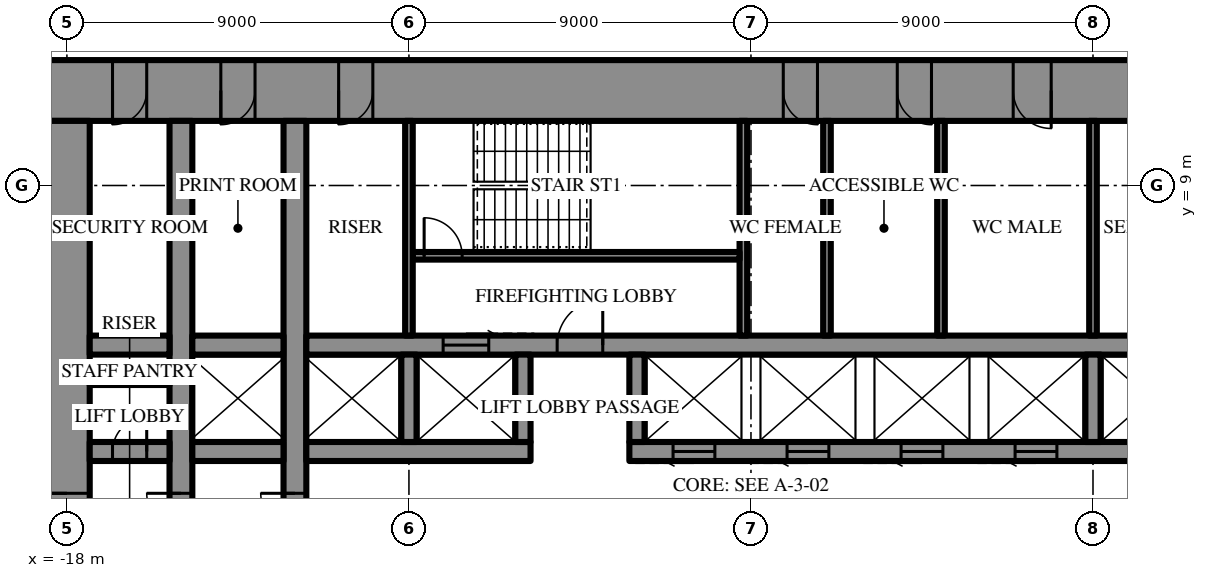
"""IFC4 building model, lengths in metres.
Left out: names, types, materials, properties, quantities, classifications, styles, units other than length and angle.
Written with IfcOpenShell. Run it as: python <this file> out.ifc"""

import sys

from ifc_helpers import new_model, si_unit, direction, frame, frame_2d, origin, place, context, subcontext, project, spatial, rectangle, extrude, element, fill, save


model = new_model("IFC4")
c1 = context("Model", 3, precision=1e-05, world=origin(), true_north=direction((0.0, 1.0)))
c2 = subcontext(c1, "Body", "Model", "MODEL_VIEW")
j1 = project(units=[si_unit("LENGTHUNIT", "METRE"), si_unit("PLANEANGLEUNIT", "RADIAN")], contexts=[c1])
p1 = place(None, origin())
s1 = spatial("IfcSite", under=j1, at=p1, CompositionType="ELEMENT")
p2 = place(p1, origin())
s2 = spatial("IfcBuilding", under=s1, at=p2, CompositionType="ELEMENT")
p3 = place(p2, frame((0.0, 0.0, 136.3)))
s3 = spatial("IfcBuildingStorey", under=s2, at=p3, CompositionType="ELEMENT", Elevation=136.3)
p4 = place(p3, frame((-18.6, 11.5, 0.0), z_axis=(0.0, 0.0, 1.0), x_axis=(1.0, 0.0, 0.0)))
e1 = element("IfcWall", 1, at=p4, inside=s3, PredefinedType="SHEAR", context=c2, shape_type="SweptSolid", body=[
    extrude(rectangle(XDim=37.2, YDim=1.6, at=frame_2d((18.6, 0.0))), origin(), (0.0, 0.0, 1.0), 4.2),
])
p5 = place(p4, frame((19.45, 0.0, 0.0)))
e2 = element("IfcOpeningElement", 2, at=p5, cuts=e1, PredefinedType="OPENING", context=c2, shape_type="SweptSolid", body=[
    extrude(rectangle(XDim=0.9, YDim=2.2, at=frame_2d((0.45, 1.1))), frame((0.0, 0.81, 0.0), z_axis=(0.0, -1.0, 0.0), x_axis=(1.0, 0.0, 0.0)), (0.0, 0.0, 1.0), 1.62),
])
p6 = place(p4, frame((22.45, 0.0, 0.0)))
e3 = element("IfcOpeningElement", 3, at=p6, cuts=e1, PredefinedType="OPENING", context=c2, shape_type="SweptSolid", body=[
    extrude(rectangle(XDim=0.9, YDim=2.2, at=frame_2d((0.45, 1.1))), frame((0.0, 0.81, 0.0), z_axis=(0.0, -1.0, 0.0), x_axis=(1.0, 0.0, 0.0)), (0.0, 0.0, 1.0), 1.62),
])
p7 = place(p4, frame((25.5, 0.0, 0.0)))
e4 = element("IfcOpeningElement", 4, at=p7, cuts=e1, PredefinedType="OPENING", context=c2, shape_type="SweptSolid", body=[
    extrude(rectangle(XDim=1.0, YDim=2.2, at=frame_2d((0.5, 1.1))), frame((0.0, 0.81, 0.0), z_axis=(0.0, -1.0, 0.0), x_axis=(1.0, 0.0, 0.0)), (0.0, 0.0, 1.0), 1.62),
])
p8 = place(p4, frame((1.8, 0.0, 0.0)))
e5 = element("IfcOpeningElement", 5, at=p8, cuts=e1, PredefinedType="OPENING", context=c2, shape_type="SweptSolid", body=[
    extrude(rectangle(XDim=0.9, YDim=2.2, at=frame_2d((0.45, 1.1))), frame((0.0, 0.81, 0.0), z_axis=(0.0, -1.0, 0.0), x_axis=(1.0, 0.0, 0.0)), (0.0, 0.0, 1.0), 1.62),
])
p9 = place(p4, frame((4.65, 0.0, 0.0)))
e6 = element("IfcOpeningElement", 6, at=p9, cuts=e1, PredefinedType="OPENING", context=c2, shape_type="SweptSolid", body=[
    extrude(rectangle(XDim=0.9, YDim=2.2, at=frame_2d((0.45, 1.1))), frame((0.0, 0.81, 0.0), z_axis=(0.0, -1.0, 0.0), x_axis=(1.0, 0.0, 0.0)), (0.0, 0.0, 1.0), 1.62),
])
p10 = place(p4, frame((7.75, 0.0, 0.0)))
e7 = element("IfcOpeningElement", 7, at=p10, cuts=e1, PredefinedType="OPENING", context=c2, shape_type="SweptSolid", body=[
    extrude(rectangle(XDim=0.9, YDim=2.2, at=frame_2d((0.45, 1.1))), frame((0.0, 0.81, 0.0), z_axis=(0.0, -1.0, 0.0), x_axis=(1.0, 0.0, 0.0)), (0.0, 0.0, 1.0), 1.62),
])
p11 = place(p4, frame((28.55, 0.0, 0.0)))
e8 = element("IfcOpeningElement", 8, at=p11, cuts=e1, PredefinedType="OPENING", context=c2, shape_type="SweptSolid", body=[
    extrude(rectangle(XDim=0.9, YDim=2.2, at=frame_2d((0.45, 1.1))), frame((0.0, 0.81, 0.0), z_axis=(0.0, -1.0, 0.0), x_axis=(1.0, 0.0, 0.0)), (0.0, 0.0, 1.0), 1.62),
])
p12 = place(p4, frame((31.65, 0.0, 0.0)))
e9 = element("IfcOpeningElement", 9, at=p12, cuts=e1, PredefinedType="OPENING", context=c2, shape_type="SweptSolid", body=[
    extrude(rectangle(XDim=0.9, YDim=2.2, at=frame_2d((0.45, 1.1))), frame((0.0, 0.81, 0.0), z_axis=(0.0, -1.0, 0.0), x_axis=(1.0, 0.0, 0.0)), (0.0, 0.0, 1.0), 1.62),
])
p13 = place(p4, frame((34.5, 0.0, 0.0)))
e10 = element("IfcOpeningElement", 10, at=p13, cuts=e1, PredefinedType="OPENING", context=c2, shape_type="SweptSolid", body=[
    extrude(rectangle(XDim=0.9, YDim=2.2, at=frame_2d((0.45, 1.1))), frame((0.0, 0.81, 0.0), z_axis=(0.0, -1.0, 0.0), x_axis=(1.0, 0.0, 0.0)), (0.0, 0.0, 1.0), 1.62),
])
p14 = place(p3, frame((-18.0, 10.7, 0.0), z_axis=(0.0, 0.0, 1.0), x_axis=(0.0, -1.0, 0.0)))
e11 = element("IfcWall", 11, at=p14, inside=s3, PredefinedType="SHEAR", context=c2, shape_type="SweptSolid", body=[
    extrude(rectangle(XDim=21.4, YDim=1.2, at=frame_2d((10.7, 0.0))), origin(), (0.0, 0.0, 1.0), 4.2),
])
p15 = place(p14, frame((9.8, 0.0, 0.0)))
e12 = element("IfcOpeningElement", 12, at=p15, cuts=e11, PredefinedType="OPENING", context=c2, shape_type="SweptSolid", body=[
    extrude(rectangle(XDim=1.8, YDim=2.4, at=frame_2d((0.9, 1.2))), frame((0.0, 0.61, 0.0), z_axis=(0.0, -1.0, 0.0), x_axis=(1.0, 0.0, 0.0)), (0.0, 0.0, 1.0), 1.22),
])
p16 = place(p3, frame((-12.0, -10.7, 0.0), z_axis=(0.0, 0.0, 1.0), x_axis=(0.0, 1.0, 0.0)))
e13 = element("IfcWall", 13, at=p16, inside=s3, PredefinedType="SHEAR", context=c2, shape_type="SweptSolid", body=[
    extrude(rectangle(XDim=21.4, YDim=0.6, at=frame_2d((10.7, 0.0))), origin(), (0.0, 0.0, 1.0), 4.2),
])
p17 = place(p16, frame((9.8, 0.0, 0.0)))
e14 = element("IfcOpeningElement", 14, at=p17, cuts=e13, PredefinedType="OPENING", context=c2, shape_type="SweptSolid", body=[
    extrude(rectangle(XDim=1.8, YDim=2.4, at=frame_2d((0.9, 1.2))), frame((0.0, 0.31, 0.0), z_axis=(0.0, -1.0, 0.0), x_axis=(1.0, 0.0, 0.0)), (0.0, 0.0, 1.0), 0.62),
])
p18 = place(p3, frame((-15.0, -10.7, 0.0), z_axis=(0.0, 0.0, 1.0), x_axis=(0.0, 1.0, 0.0)))
e15 = element("IfcWall", 15, at=p18, inside=s3, PredefinedType="SHEAR", context=c2, shape_type="SweptSolid", body=[
    extrude(rectangle(XDim=21.4, YDim=0.6, at=frame_2d((10.7, 0.0))), origin(), (0.0, 0.0, 1.0), 4.2),
])
p19 = place(p18, frame((9.8, 0.0, 0.0)))
e16 = element("IfcOpeningElement", 16, at=p19, cuts=e15, PredefinedType="OPENING", context=c2, shape_type="SweptSolid", body=[
    extrude(rectangle(XDim=1.8, YDim=2.4, at=frame_2d((0.9, 1.2))), frame((0.0, 0.31, 0.0), z_axis=(0.0, -1.0, 0.0), x_axis=(1.0, 0.0, 0.0)), (0.0, 0.0, 1.0), 0.62),
])
p20 = place(p3, frame((-17.4, 2.0, 0.0), z_axis=(0.0, 0.0, 1.0), x_axis=(1.0, 0.0, 0.0)))
e17 = element("IfcWall", 17, at=p20, inside=s3, PredefinedType="SHEAR", context=c2, shape_type="SweptSolid", body=[
    extrude(rectangle(XDim=2.1, YDim=0.5, at=frame_2d((1.05, 0.0))), origin(), (0.0, 0.0, 1.0), 4.2),
])
p21 = place(p20, frame((0.6, 0.0, 0.0)))
e18 = element("IfcOpeningElement", 18, at=p21, cuts=e17, PredefinedType="OPENING", context=c2, shape_type="SweptSolid", body=[
    extrude(rectangle(XDim=0.9, YDim=2.2, at=frame_2d((0.45, 1.1))), frame((0.0, 0.26, 0.0), z_axis=(0.0, -1.0, 0.0), x_axis=(1.0, 0.0, 0.0)), (0.0, 0.0, 1.0), 0.52),
])
p22 = place(p3, frame((-14.7, 2.0, 0.0), z_axis=(0.0, 0.0, 1.0), x_axis=(1.0, 0.0, 0.0)))
e19 = element("IfcWall", 19, at=p22, inside=s3, PredefinedType="SHEAR", context=c2, shape_type="SweptSolid", body=[
    extrude(rectangle(XDim=2.4, YDim=0.5, at=frame_2d((1.2, 0.0))), origin(), (0.0, 0.0, 1.0), 4.2),
])
p23 = place(p3, frame((-11.7, 2.0, 0.0), z_axis=(0.0, 0.0, 1.0), x_axis=(1.0, 0.0, 0.0)))
e20 = element("IfcWall", 20, at=p23, inside=s3, PredefinedType="SHEAR", context=c2, shape_type="SweptSolid", body=[
    extrude(rectangle(XDim=5.9, YDim=0.5, at=frame_2d((2.95, 0.0))), origin(), (0.0, 0.0, 1.0), 4.2),
])
p24 = place(p3, frame((-3.2, 2.0, 0.0), z_axis=(0.0, 0.0, 1.0), x_axis=(1.0, 0.0, 0.0)))
e21 = element("IfcWall", 21, at=p24, inside=s3, PredefinedType="SHEAR", context=c2, shape_type="SweptSolid", body=[
    extrude(rectangle(XDim=14.9, YDim=0.5, at=frame_2d((7.45, 0.0))), origin(), (0.0, 0.0, 1.0), 4.2),
])
p25 = place(p24, frame((1.15, 0.0, 0.0)))
e22 = element("IfcOpeningElement", 22, at=p25, cuts=e21, PredefinedType="OPENING", context=c2, shape_type="SweptSolid", body=[
    extrude(rectangle(XDim=1.1, YDim=2.2, at=frame_2d((0.55, 1.1))), frame((0.0, 0.26, 0.0), z_axis=(0.0, -1.0, 0.0), x_axis=(1.0, 0.0, 0.0)), (0.0, 0.0, 1.0), 0.52),
])
p26 = place(p24, frame((4.15, 0.0, 0.0)))
e23 = element("IfcOpeningElement", 23, at=p26, cuts=e21, PredefinedType="OPENING", context=c2, shape_type="SweptSolid", body=[
    extrude(rectangle(XDim=1.1, YDim=2.2, at=frame_2d((0.55, 1.1))), frame((0.0, 0.26, 0.0), z_axis=(0.0, -1.0, 0.0), x_axis=(1.0, 0.0, 0.0)), (0.0, 0.0, 1.0), 0.52),
])
p27 = place(p24, frame((7.15, 0.0, 0.0)))
e24 = element("IfcOpeningElement", 24, at=p27, cuts=e21, PredefinedType="OPENING", context=c2, shape_type="SweptSolid", body=[
    extrude(rectangle(XDim=1.1, YDim=2.2, at=frame_2d((0.55, 1.1))), frame((0.0, 0.26, 0.0), z_axis=(0.0, -1.0, 0.0), x_axis=(1.0, 0.0, 0.0)), (0.0, 0.0, 1.0), 0.52),
])
p28 = place(p24, frame((10.15, 0.0, 0.0)))
e25 = element("IfcOpeningElement", 25, at=p28, cuts=e21, PredefinedType="OPENING", context=c2, shape_type="SweptSolid", body=[
    extrude(rectangle(XDim=1.1, YDim=2.2, at=frame_2d((0.55, 1.1))), frame((0.0, 0.26, 0.0), z_axis=(0.0, -1.0, 0.0), x_axis=(1.0, 0.0, 0.0)), (0.0, 0.0, 1.0), 0.52),
])
p29 = place(p3, frame((-17.4, 4.8, 0.0), z_axis=(0.0, 0.0, 1.0), x_axis=(1.0, 0.0, 0.0)))
e26 = element("IfcWall", 26, at=p29, inside=s3, PredefinedType="SHEAR", context=c2, shape_type="SweptSolid", body=[
    extrude(rectangle(XDim=2.1, YDim=0.5, at=frame_2d((1.05, 0.0))), origin(), (0.0, 0.0, 1.0), 4.2),
])
p30 = place(p3, frame((-14.7, 4.8, 0.0), z_axis=(0.0, 0.0, 1.0), x_axis=(1.0, 0.0, 0.0)))
e27 = element("IfcWall", 27, at=p30, inside=s3, PredefinedType="SHEAR", context=c2, shape_type="SweptSolid", body=[
    extrude(rectangle(XDim=2.4, YDim=0.5, at=frame_2d((1.2, 0.0))), origin(), (0.0, 0.0, 1.0), 4.2),
])
p31 = place(p3, frame((-11.7, 4.8, 0.0), z_axis=(0.0, 0.0, 1.0), x_axis=(1.0, 0.0, 0.0)))
e28 = element("IfcWall", 28, at=p31, inside=s3, PredefinedType="SHEAR", context=c2, shape_type="SweptSolid", body=[
    extrude(rectangle(XDim=23.4, YDim=0.5, at=frame_2d((11.7, 0.0))), origin(), (0.0, 0.0, 1.0), 4.2),
])
p32 = place(p31, frame((6.6, 0.0, 0.0)))
e29 = element("IfcOpeningElement", 29, at=p32, cuts=e28, PredefinedType="OPENING", context=c2, shape_type="SweptSolid", body=[
    extrude(rectangle(XDim=1.2, YDim=2.2, at=frame_2d((0.6, 1.1))), frame((0.0, 0.26, 0.0), z_axis=(0.0, -1.0, 0.0), x_axis=(1.0, 0.0, 0.0)), (0.0, 0.0, 1.0), 0.52),
])
p33 = place(p31, frame((3.6, 0.0, 0.0)))
e30 = element("IfcOpeningElement", 30, at=p33, cuts=e28, PredefinedType="OPENING", context=c2, shape_type="SweptSolid", body=[
    extrude(rectangle(XDim=1.2, YDim=2.2, at=frame_2d((0.6, 1.1))), frame((0.0, 0.26, 0.0), z_axis=(0.0, -1.0, 0.0), x_axis=(1.0, 0.0, 0.0)), (0.0, 0.0, 1.0), 0.52),
])
for number, where, z_axis, x_axis in (
    (31, (-9.0, 2.25, 0.0), (0.0, 0.0, 1.0), (0.0, 1.0, 0.0)),
    (32, (-6.0, 2.25, 0.0), (0.0, 0.0, 1.0), (0.0, 1.0, 0.0)),
    (33, (-3.0, 2.25, 0.0), (0.0, 0.0, 1.0), (0.0, 1.0, 0.0)),
    (34, (9.0, 2.25, 0.0), (0.0, 0.0, 1.0), (0.0, 1.0, 0.0)),
):
    element("IfcWall", number, at=place(p3, frame(where, z_axis=z_axis, x_axis=x_axis)), inside=s3, PredefinedType="SHEAR", context=c2, shape_type="SweptSolid", body=[
        extrude(rectangle(XDim=2.3, YDim=0.4, at=frame_2d((1.15, 0.0))), origin(), (0.0, 0.0, 1.0), 4.2),
    ])
p34 = place(p3, frame((-0.2, 5.05, 0.0), z_axis=(0.0, 0.0, 1.0), x_axis=(0.0, 1.0, 0.0)))
e35 = element("IfcWall", 35, at=p34, inside=s3, PredefinedType="SHEAR", context=c2, shape_type="SweptSolid", body=[
    extrude(rectangle(XDim=5.65, YDim=0.2, at=frame_2d((2.825, 0.0))), origin(), (0.0, 0.0, 1.0), 4.2),
])
p35 = place(p3, frame((-8.9, 7.15, 0.0), z_axis=(0.0, 0.0, 1.0), x_axis=(1.0, 0.0, 0.0)))
e36 = element("IfcWall", 36, at=p35, inside=s3, PredefinedType="SHEAR", context=c2, shape_type="SweptSolid", body=[
    extrude(rectangle(XDim=8.6, YDim=0.2, at=frame_2d((4.3, 0.0))), origin(), (0.0, 0.0, 1.0), 4.2),
])
p36 = place(p35, frame((0.3, 0.0, 0.0)))
e37 = element("IfcOpeningElement", 37, at=p36, cuts=e36, PredefinedType="OPENING", context=c2, shape_type="SweptSolid", body=[
    extrude(rectangle(XDim=1.0, YDim=2.2, at=frame_2d((0.5, 1.1))), frame((0.0, 0.11, 0.0), z_axis=(0.0, -1.0, 0.0), x_axis=(1.0, 0.0, 0.0)), (0.0, 0.0, 1.0), 0.22),
])
for number, where, z_axis, x_axis in (
    (38, (-9.0, 5.05, 0.0), (0.0, 0.0, 1.0), (0.0, 1.0, 0.0)),
    (39, (9.0, 5.05, 0.0), (0.0, 0.0, 1.0), (0.0, 1.0, 0.0)),
    (40, (2.0, 5.05, 0.0), (0.0, 0.0, 1.0), (0.0, 1.0, 0.0)),
    (41, (5.0, 5.05, 0.0), (0.0, 0.0, 1.0), (0.0, 1.0, 0.0)),
):
    element("IfcWall", number, at=place(p3, frame(where, z_axis=z_axis, x_axis=x_axis)), inside=s3, PredefinedType="PARTITIONING", context=c2, shape_type="SweptSolid", body=[
        extrude(rectangle(XDim=5.65, YDim=0.2, at=frame_2d((2.825, 0.0))), origin(), (0.0, 0.0, 1.0), 4.0),
    ])
p37 = place(p3, frame((-17.4, 3.85, 0.0), z_axis=(0.0, 0.0, 1.0), x_axis=(1.0, 0.0, 0.0)))
e42 = element("IfcWall", 42, at=p37, inside=s3, PredefinedType="PARTITIONING", context=c2, shape_type="SweptSolid", body=[
    extrude(rectangle(XDim=2.1, YDim=0.2, at=frame_2d((1.05, 0.0))), origin(), (0.0, 0.0, 1.0), 4.0),
])
p38 = place(p15, frame((1.8, 0.0, 0.0), z_axis=(0.0, 0.0, 1.0), x_axis=(-1.0, 0.0, 0.0)))
e43 = element("IfcDoor", 43, at=p38, inside=s3, OperationType="DOUBLE_DOOR_SINGLE_SWING", PredefinedType="DOOR", context=c2, shape_type="SweptSolid", body=[
    extrude(rectangle(XDim=1.8, YDim=2.4, at=frame_2d((0.9, 1.2))), frame((0.0, 0.025, 0.0), z_axis=(0.0, -1.0, 0.0), x_axis=(1.0, 0.0, 0.0)), (0.0, 0.0, 1.0), 0.05),
])
fill(e12, e43)
p39 = place(p32, origin())
e44 = element("IfcDoor", 44, at=p39, inside=s3, OperationType="SINGLE_SWING_LEFT", PredefinedType="DOOR", context=c2, shape_type="SweptSolid", body=[
    extrude(rectangle(XDim=1.2, YDim=2.2, at=frame_2d((0.6, 1.1))), frame((0.0, 0.025, 0.0), z_axis=(0.0, -1.0, 0.0), x_axis=(1.0, 0.0, 0.0)), (0.0, 0.0, 1.0), 0.05),
])
fill(e29, e44)
p40 = place(p36, origin())
e45 = element("IfcDoor", 45, at=p40, inside=s3, OperationType="SINGLE_SWING_RIGHT", PredefinedType="DOOR", context=c2, shape_type="SweptSolid", body=[
    extrude(rectangle(XDim=1.0, YDim=2.2, at=frame_2d((0.5, 1.1))), frame((0.0, 0.025, 0.0), z_axis=(0.0, -1.0, 0.0), x_axis=(1.0, 0.0, 0.0)), (0.0, 0.0, 1.0), 0.05),
])
fill(e37, e45)
p41 = place(p5, frame((0.9, 0.0, 0.0), z_axis=(0.0, 0.0, 1.0), x_axis=(-1.0, 0.0, 0.0)))
e46 = element("IfcDoor", 46, at=p41, inside=s3, OperationType="SINGLE_SWING_RIGHT", PredefinedType="DOOR", context=c2, shape_type="SweptSolid", body=[
    extrude(rectangle(XDim=0.9, YDim=2.2, at=frame_2d((0.45, 1.1))), frame((0.0, 0.025, 0.0), z_axis=(0.0, -1.0, 0.0), x_axis=(1.0, 0.0, 0.0)), (0.0, 0.0, 1.0), 0.05),
])
fill(e2, e46)
p42 = place(p6, frame((0.9, 0.0, 0.0), z_axis=(0.0, 0.0, 1.0), x_axis=(-1.0, 0.0, 0.0)))
e47 = element("IfcDoor", 47, at=p42, inside=s3, OperationType="SINGLE_SWING_RIGHT", PredefinedType="DOOR", context=c2, shape_type="SweptSolid", body=[
    extrude(rectangle(XDim=0.9, YDim=2.2, at=frame_2d((0.45, 1.1))), frame((0.0, 0.025, 0.0), z_axis=(0.0, -1.0, 0.0), x_axis=(1.0, 0.0, 0.0)), (0.0, 0.0, 1.0), 0.05),
])
fill(e3, e47)
p43 = place(p7, frame((1.0, 0.0, 0.0), z_axis=(0.0, 0.0, 1.0), x_axis=(-1.0, 0.0, 0.0)))
e48 = element("IfcDoor", 48, at=p43, inside=s3, OperationType="SINGLE_SWING_RIGHT", PredefinedType="DOOR", context=c2, shape_type="SweptSolid", body=[
    extrude(rectangle(XDim=1.0, YDim=2.2, at=frame_2d((0.5, 1.1))), frame((0.0, 0.025, 0.0), z_axis=(0.0, -1.0, 0.0), x_axis=(1.0, 0.0, 0.0)), (0.0, 0.0, 1.0), 0.05),
])
fill(e4, e48)
p44 = place(p8, frame((0.9, 0.0, 0.0), z_axis=(0.0, 0.0, 1.0), x_axis=(-1.0, 0.0, 0.0)))
e49 = element("IfcDoor", 49, at=p44, inside=s3, OperationType="SINGLE_SWING_LEFT", PredefinedType="DOOR", context=c2, shape_type="SweptSolid", body=[
    extrude(rectangle(XDim=0.9, YDim=2.2, at=frame_2d((0.45, 1.1))), frame((0.0, 0.025, 0.0), z_axis=(0.0, -1.0, 0.0), x_axis=(1.0, 0.0, 0.0)), (0.0, 0.0, 1.0), 0.05),
])
fill(e5, e49)
p45 = place(p9, frame((0.9, 0.0, 0.0), z_axis=(0.0, 0.0, 1.0), x_axis=(-1.0, 0.0, 0.0)))
e50 = element("IfcDoor", 50, at=p45, inside=s3, OperationType="SINGLE_SWING_LEFT", PredefinedType="DOOR", context=c2, shape_type="SweptSolid", body=[
    extrude(rectangle(XDim=0.9, YDim=2.2, at=frame_2d((0.45, 1.1))), frame((0.0, 0.025, 0.0), z_axis=(0.0, -1.0, 0.0), x_axis=(1.0, 0.0, 0.0)), (0.0, 0.0, 1.0), 0.05),
])
fill(e6, e50)
p46 = place(p10, frame((0.9, 0.0, 0.0), z_axis=(0.0, 0.0, 1.0), x_axis=(-1.0, 0.0, 0.0)))
e51 = element("IfcDoor", 51, at=p46, inside=s3, OperationType="SINGLE_SWING_LEFT", PredefinedType="DOOR", context=c2, shape_type="SweptSolid", body=[
    extrude(rectangle(XDim=0.9, YDim=2.2, at=frame_2d((0.45, 1.1))), frame((0.0, 0.025, 0.0), z_axis=(0.0, -1.0, 0.0), x_axis=(1.0, 0.0, 0.0)), (0.0, 0.0, 1.0), 0.05),
])
fill(e7, e51)
p47 = place(p21, origin())
e52 = element("IfcDoor", 52, at=p47, inside=s3, OperationType="SINGLE_SWING_LEFT", PredefinedType="DOOR", context=c2, shape_type="SweptSolid", body=[
    extrude(rectangle(XDim=0.9, YDim=2.2, at=frame_2d((0.45, 1.1))), frame((0.0, 0.025, 0.0), z_axis=(0.0, -1.0, 0.0), x_axis=(1.0, 0.0, 0.0)), (0.0, 0.0, 1.0), 0.05),
])
fill(e18, e52)
p48 = place(p17, origin())
e53 = element("IfcDoor", 53, at=p48, inside=s3, OperationType="DOUBLE_DOOR_SINGLE_SWING", PredefinedType="DOOR", context=c2, shape_type="SweptSolid", body=[
    extrude(rectangle(XDim=1.8, YDim=2.4, at=frame_2d((0.9, 1.2))), frame((0.0, 0.025, 0.0), z_axis=(0.0, -1.0, 0.0), x_axis=(1.0, 0.0, 0.0)), (0.0, 0.0, 1.0), 0.05),
])
fill(e14, e53)
p49 = place(p19, origin())
e54 = element("IfcDoor", 54, at=p49, inside=s3, OperationType="DOUBLE_DOOR_SINGLE_SWING", PredefinedType="DOOR", context=c2, shape_type="SweptSolid", body=[
    extrude(rectangle(XDim=1.8, YDim=2.4, at=frame_2d((0.9, 1.2))), frame((0.0, 0.025, 0.0), z_axis=(0.0, -1.0, 0.0), x_axis=(1.0, 0.0, 0.0)), (0.0, 0.0, 1.0), 0.05),
])
fill(e16, e54)
p50 = place(p33, origin())
e55 = element("IfcDoor", 55, at=p50, inside=s3, OperationType="SLIDING_TO_LEFT", PredefinedType="DOOR", context=c2, shape_type="SweptSolid", body=[
    extrude(rectangle(XDim=1.2, YDim=2.2, at=frame_2d((0.6, 1.1))), frame((0.0, 0.025, 0.0), z_axis=(0.0, -1.0, 0.0), x_axis=(1.0, 0.0, 0.0)), (0.0, 0.0, 1.0), 0.05),
])
fill(e30, e55)
p51 = place(p25, frame((1.1, 0.0, 0.0), z_axis=(0.0, 0.0, 1.0), x_axis=(-1.0, 0.0, 0.0)))
e56 = element("IfcDoor", 56, at=p51, inside=s3, OperationType="SLIDING_TO_LEFT", PredefinedType="DOOR", context=c2, shape_type="SweptSolid", body=[
    extrude(rectangle(XDim=1.1, YDim=2.2, at=frame_2d((0.55, 1.1))), frame((0.0, 0.025, 0.0), z_axis=(0.0, -1.0, 0.0), x_axis=(1.0, 0.0, 0.0)), (0.0, 0.0, 1.0), 0.05),
])
fill(e22, e56)
p52 = place(p26, frame((1.1, 0.0, 0.0), z_axis=(0.0, 0.0, 1.0), x_axis=(-1.0, 0.0, 0.0)))
e57 = element("IfcDoor", 57, at=p52, inside=s3, OperationType="SLIDING_TO_LEFT", PredefinedType="DOOR", context=c2, shape_type="SweptSolid", body=[
    extrude(rectangle(XDim=1.1, YDim=2.2, at=frame_2d((0.55, 1.1))), frame((0.0, 0.025, 0.0), z_axis=(0.0, -1.0, 0.0), x_axis=(1.0, 0.0, 0.0)), (0.0, 0.0, 1.0), 0.05),
])
fill(e23, e57)
p53 = place(p27, frame((1.1, 0.0, 0.0), z_axis=(0.0, 0.0, 1.0), x_axis=(-1.0, 0.0, 0.0)))
e58 = element("IfcDoor", 58, at=p53, inside=s3, OperationType="SLIDING_TO_LEFT", PredefinedType="DOOR", context=c2, shape_type="SweptSolid", body=[
    extrude(rectangle(XDim=1.1, YDim=2.2, at=frame_2d((0.55, 1.1))), frame((0.0, 0.025, 0.0), z_axis=(0.0, -1.0, 0.0), x_axis=(1.0, 0.0, 0.0)), (0.0, 0.0, 1.0), 0.05),
])
fill(e24, e58)
p54 = place(p28, frame((1.1, 0.0, 0.0), z_axis=(0.0, 0.0, 1.0), x_axis=(-1.0, 0.0, 0.0)))
e59 = element("IfcDoor", 59, at=p54, inside=s3, OperationType="SLIDING_TO_LEFT", PredefinedType="DOOR", context=c2, shape_type="SweptSolid", body=[
    extrude(rectangle(XDim=1.1, YDim=2.2, at=frame_2d((0.55, 1.1))), frame((0.0, 0.025, 0.0), z_axis=(0.0, -1.0, 0.0), x_axis=(1.0, 0.0, 0.0)), (0.0, 0.0, 1.0), 0.05),
])
fill(e25, e59)
save(model, sys.argv[1])
